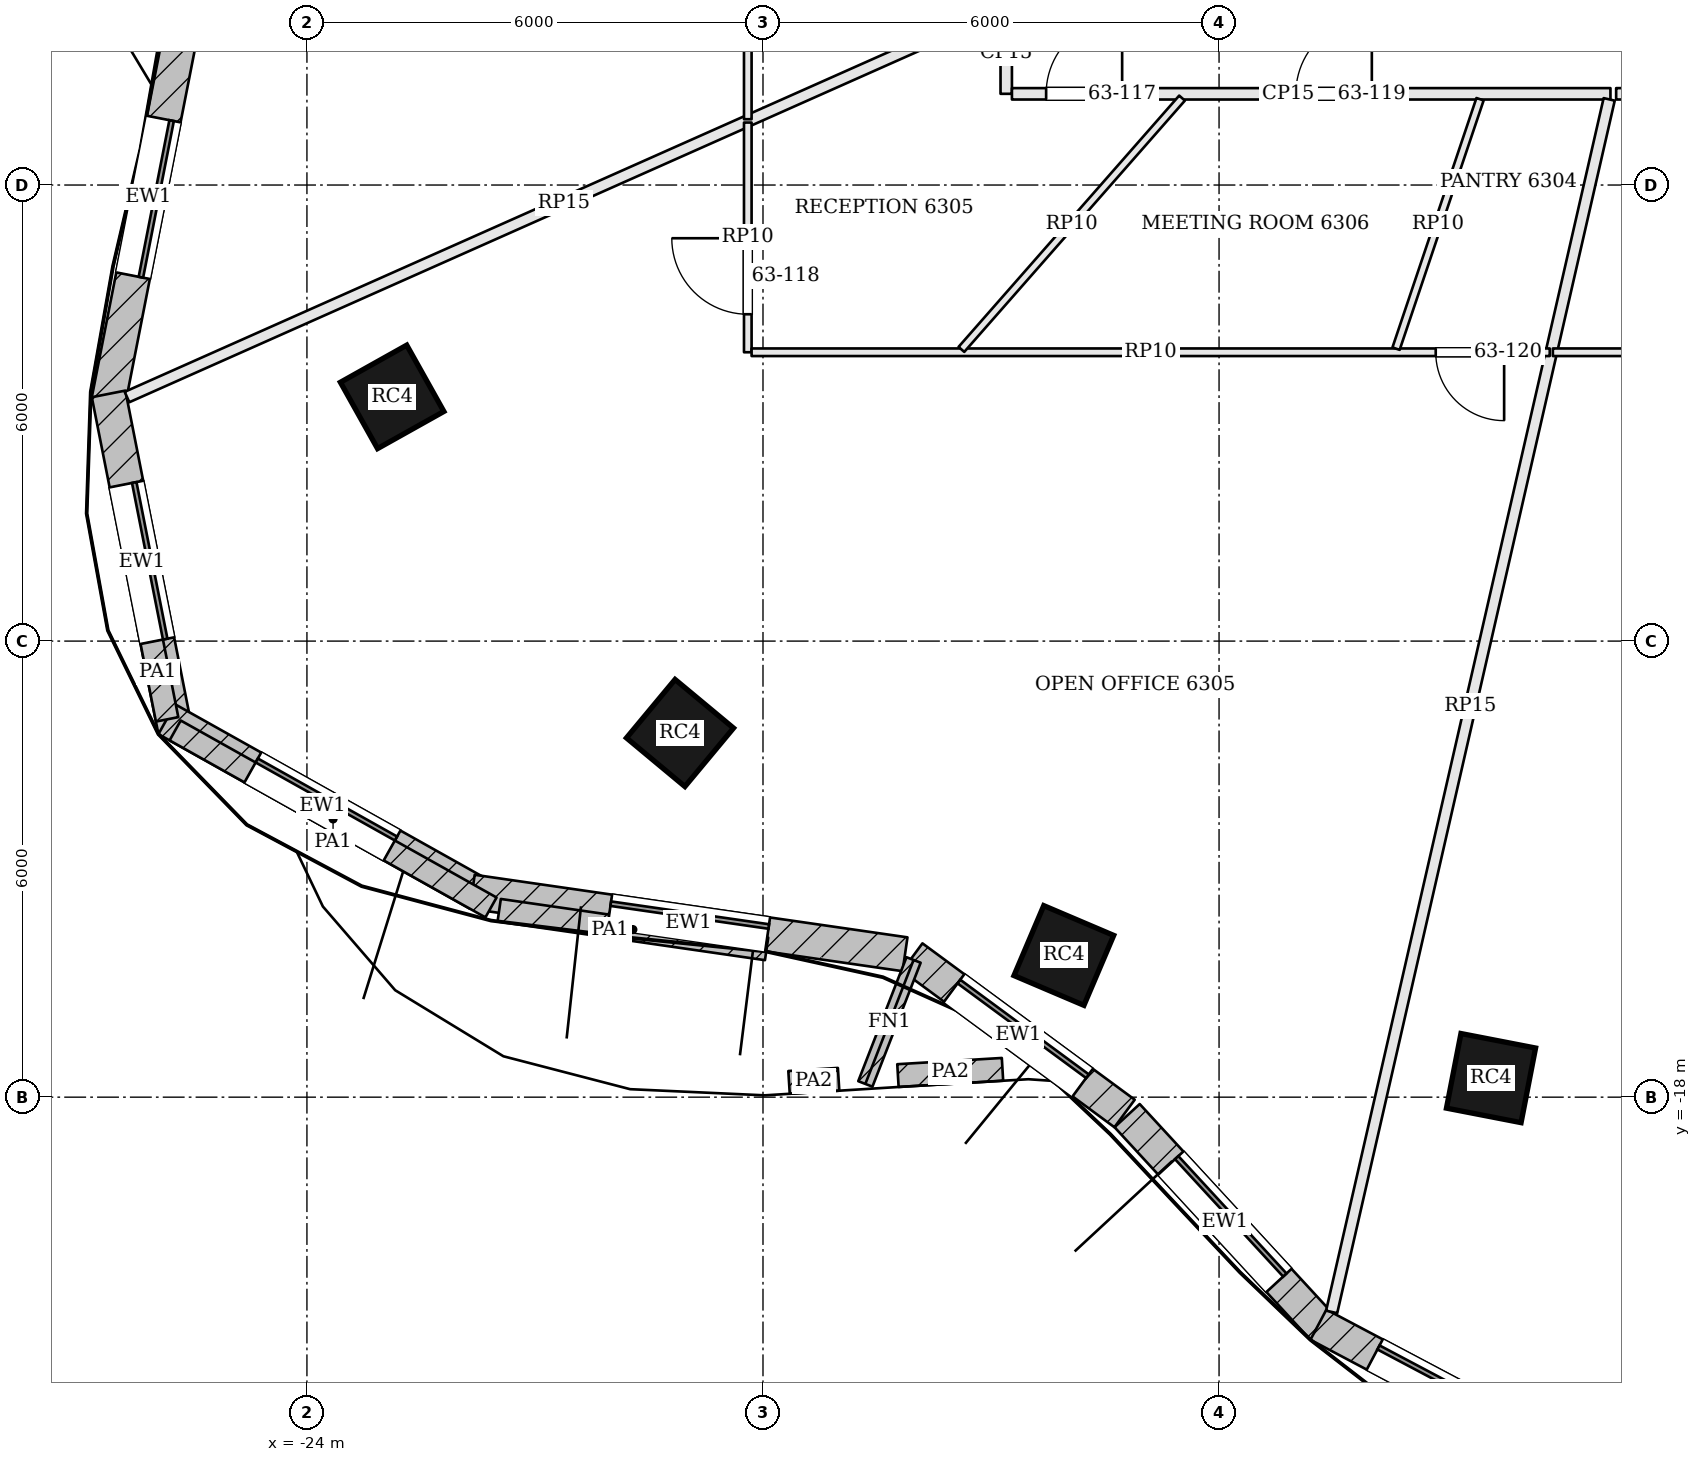
"""IFC4 building model, lengths in metres.
Left out: names, types, materials, properties, quantities, classifications, styles, units other than length and angle.
Written with IfcOpenShell. Run it as: python <this file> out.ifc"""

import sys

from ifc_helpers import new_model, si_unit, direction, frame, frame_2d, origin, origin_2d, place, context, subcontext, project, spatial, rectangle, extrude, element, fill, save


model = new_model("IFC4")
c1 = context("Model", 3, precision=1e-05, world=origin(), true_north=direction((0.0, 1.0)))
c2 = subcontext(c1, "Body", "Model", "MODEL_VIEW")
j1 = project(units=[si_unit("LENGTHUNIT", "METRE"), si_unit("PLANEANGLEUNIT", "RADIAN")], contexts=[c1])
p1 = place(None, origin())
s1 = spatial("IfcSite", under=j1, at=p1, CompositionType="ELEMENT")
p2 = place(p1, origin())
s2 = spatial("IfcBuilding", under=s1, at=p2, CompositionType="ELEMENT")
p3 = place(p2, frame((0.0, 0.0, 256.5)))
s3 = spatial("IfcBuildingStorey", under=s2, at=p3, CompositionType="ELEMENT", Elevation=256.5)
for number, where, z_axis, x_axis in (
    (1, (-22.879, -8.787, 0.0), (0.0, 0.0, 1.0), (0.489, -0.873, 0.0)),
    (2, (-19.092, -13.209, 0.0), (0.0, 0.0, 1.0), (0.769, -0.639, 0.0)),
    (3, (-14.042, -16.136, 0.0), (0.0, 0.0, 1.0), (0.92, -0.392, 0.0)),
    (4, (-8.422, -17.749, 0.0), (0.0, 0.0, 1.0), (0.982, -0.191, 0.0)),
):
    element("IfcColumn", number, at=place(p3, frame(where, z_axis=z_axis, x_axis=x_axis)), inside=s3, PredefinedType="COLUMN", context=c2, shape_type="SweptSolid", body=[
        extrude(rectangle(XDim=1.0, YDim=1.0, at=origin_2d()), origin(), (0.0, 0.0, 1.0), 3.9),
    ])
p4 = place(p3, frame((-25.561, -3.49, 0.0), z_axis=(0.0, 0.0, 1.0), x_axis=(-0.192494026297, -0.981298145234, 0.0)))
e5 = element("IfcWall", 5, at=p4, inside=s3, PredefinedType="SOLIDWALL", context=c2, shape_type="SweptSolid", body=[
    extrude(rectangle(XDim=5.446, YDim=0.45, at=frame_2d((2.723, 0.0))), origin(), (0.0, 0.0, 1.0), 3.7),
])
p5 = place(p4, frame((1.673, 0.0, 0.9)))
e6 = element("IfcOpeningElement", 6, at=p5, cuts=e5, PredefinedType="OPENING", context=c2, shape_type="SweptSolid", body=[
    extrude(rectangle(XDim=2.1, YDim=2.3, at=frame_2d((1.05, 1.15))), frame((0.0, 0.235, 0.0), z_axis=(0.0, -1.0, 0.0), x_axis=(1.0, 0.0, 0.0)), (0.0, 0.0, 1.0), 0.47),
])
p6 = place(p3, frame((-26.61, -8.748, 0.0), z_axis=(0.0, 0.0, 1.0), x_axis=(0.193923166402, -0.981016720312, 0.0)))
e7 = element("IfcWall", 7, at=p6, inside=s3, PredefinedType="SOLIDWALL", context=c2, shape_type="SweptSolid", body=[
    extrude(rectangle(XDim=4.518, YDim=0.45, at=frame_2d((2.259, 0.0))), origin(), (0.0, 0.0, 1.0), 3.7),
])
p7 = place(p6, frame((1.209, 0.0, 0.9)))
e8 = element("IfcOpeningElement", 8, at=p7, cuts=e7, PredefinedType="OPENING", context=c2, shape_type="SweptSolid", body=[
    extrude(rectangle(XDim=2.1, YDim=2.3, at=frame_2d((1.05, 1.15))), frame((0.0, 0.235, 0.0), z_axis=(0.0, -1.0, 0.0), x_axis=(1.0, 0.0, 0.0)), (0.0, 0.0, 1.0), 0.47),
])
p8 = place(p3, frame((-25.844, -13.028, 0.0), z_axis=(0.0, 0.0, 1.0), x_axis=(0.872346398261, -0.488888291373, 0.0)))
e9 = element("IfcWall", 9, at=p8, inside=s3, PredefinedType="SOLIDWALL", context=c2, shape_type="SweptSolid", body=[
    extrude(rectangle(XDim=4.696, YDim=0.45, at=frame_2d((2.348, 0.0))), origin(), (0.0, 0.0, 1.0), 3.7),
])
p9 = place(p8, frame((1.298, 0.0, 0.9)))
e10 = element("IfcOpeningElement", 10, at=p9, cuts=e9, PredefinedType="OPENING", context=c2, shape_type="SweptSolid", body=[
    extrude(rectangle(XDim=2.1, YDim=2.3, at=frame_2d((1.05, 1.15))), frame((0.0, 0.235, 0.0), z_axis=(0.0, -1.0, 0.0), x_axis=(1.0, 0.0, 0.0)), (0.0, 0.0, 1.0), 0.47),
])
p10 = place(p3, frame((-21.825, -15.297, 0.0), z_axis=(0.0, 0.0, 1.0), x_axis=(0.98971474215, -0.143054986527, 0.0)))
e11 = element("IfcWall", 11, at=p10, inside=s3, PredefinedType="SOLIDWALL", context=c2, shape_type="SweptSolid", body=[
    extrude(rectangle(XDim=5.753, YDim=0.45, at=frame_2d((2.876, 0.0))), origin(), (0.0, 0.0, 1.0), 3.7),
])
p11 = place(p10, frame((1.826, 0.0, 0.9)))
e12 = element("IfcOpeningElement", 12, at=p11, cuts=e11, PredefinedType="OPENING", context=c2, shape_type="SweptSolid", body=[
    extrude(rectangle(XDim=2.1, YDim=2.3, at=frame_2d((1.05, 1.15))), frame((0.0, 0.235, 0.0), z_axis=(0.0, -1.0, 0.0), x_axis=(1.0, 0.0, 0.0)), (0.0, 0.0, 1.0), 0.47),
])
p12 = place(p3, frame((-16.036, -16.158, 0.0), z_axis=(0.0, 0.0, 1.0), x_axis=(0.805181432967, -0.593028549064, 0.0)))
e13 = element("IfcWall", 13, at=p12, inside=s3, PredefinedType="SOLIDWALL", context=c2, shape_type="SweptSolid", body=[
    extrude(rectangle(XDim=3.469, YDim=0.45, at=frame_2d((1.734, 0.0))), origin(), (0.0, 0.0, 1.0), 3.7),
])
p13 = place(p12, frame((0.684, 0.0, 0.9)))
e14 = element("IfcOpeningElement", 14, at=p13, cuts=e13, PredefinedType="OPENING", context=c2, shape_type="SweptSolid", body=[
    extrude(rectangle(XDim=2.1, YDim=2.3, at=frame_2d((1.05, 1.15))), frame((0.0, 0.235, 0.0), z_axis=(0.0, -1.0, 0.0), x_axis=(1.0, 0.0, 0.0)), (0.0, 0.0, 1.0), 0.47),
])
p14 = place(p3, frame((-13.209, -18.243, 0.0), z_axis=(0.0, 0.0, 1.0), x_axis=(0.677612152497, -0.735419452278, 0.0)))
e15 = element("IfcWall", 15, at=p14, inside=s3, PredefinedType="SOLIDWALL", context=c2, shape_type="SweptSolid", body=[
    extrude(rectangle(XDim=3.797, YDim=0.45, at=frame_2d((1.898, 0.0))), origin(), (0.0, 0.0, 1.0), 3.7),
])
p15 = place(p14, frame((0.848, 0.0, 0.9)))
e16 = element("IfcOpeningElement", 16, at=p15, cuts=e15, PredefinedType="OPENING", context=c2, shape_type="SweptSolid", body=[
    extrude(rectangle(XDim=2.1, YDim=2.3, at=frame_2d((1.05, 1.15))), frame((0.0, 0.235, 0.0), z_axis=(0.0, -1.0, 0.0), x_axis=(1.0, 0.0, 0.0)), (0.0, 0.0, 1.0), 0.47),
])
p16 = place(p3, frame((-10.693, -20.993, 0.0), z_axis=(0.0, 0.0, 1.0), x_axis=(0.883817790726, -0.46783128668, 0.0)))
e17 = element("IfcWall", 17, at=p16, inside=s3, PredefinedType="SOLIDWALL", context=c2, shape_type="SweptSolid", body=[
    extrude(rectangle(XDim=3.777, YDim=0.45, at=frame_2d((1.888, 0.0))), origin(), (0.0, 0.0, 1.0), 3.7),
])
p17 = place(p16, frame((0.838, 0.0, 0.9)))
e18 = element("IfcOpeningElement", 18, at=p17, cuts=e17, PredefinedType="OPENING", context=c2, shape_type="SweptSolid", body=[
    extrude(rectangle(XDim=2.1, YDim=2.3, at=frame_2d((1.05, 1.15))), frame((0.0, 0.235, 0.0), z_axis=(0.0, -1.0, 0.0), x_axis=(1.0, 0.0, 0.0)), (0.0, 0.0, 1.0), 0.47),
])
p18 = place(p3, frame((-16.019, -16.195, 0.0), z_axis=(0.0, 0.0, 1.0), x_axis=(-0.362641522028, -0.931928713208, 0.0)))
e19 = element("IfcWall", 19, at=p18, inside=s3, PredefinedType="SOLIDWALL", context=c2, shape_type="SweptSolid", body=[
    extrude(rectangle(XDim=1.75, YDim=0.2, at=frame_2d((0.875, 0.0))), origin(), (0.0, 0.0, 1.0), 3.7),
])
p19 = place(p3, frame((-14.849, -17.634, 0.0), z_axis=(0.0, 0.0, 1.0), x_axis=(-0.998215844774, -0.059708686491, 0.0)))
e20 = element("IfcWall", 20, at=p19, inside=s3, PredefinedType="PARAPET", context=c2, shape_type="SweptSolid", body=[
    extrude(rectangle(XDim=1.378, YDim=0.3, at=frame_2d((0.689, 0.0))), origin(), (0.0, 0.0, 1.0), 1.1),
])
p20 = place(p3, frame((-17.005, -17.765, 0.0), z_axis=(0.0, 0.0, 1.0), x_axis=(-0.998026310553, -0.062797161113, 0.0)))
e21 = element("IfcWall", 21, at=p20, inside=s3, PredefinedType="PARAPET", context=c2, shape_type="SweptSolid", body=[
    extrude(rectangle(XDim=0.653, YDim=0.3, at=frame_2d((0.327, 0.0))), origin(), (0.0, 0.0, 1.0), 1.1),
])
p21 = place(p3, frame((-26.084, -11.792, 3.9), z_axis=(0.0, 0.0, 1.0), x_axis=(0.193846183911, -0.981031934742, 0.0)))
e22 = element("IfcWall", 22, at=p21, inside=s3, PredefinedType="PARAPET", context=c2, shape_type="SweptSolid", body=[
    extrude(rectangle(XDim=1.262, YDim=0.3, at=frame_2d((0.631, 0.0))), origin(), (0.0, 0.0, 1.0), 1.1),
])
p22 = place(p3, frame((-25.734, -13.176, 3.9), z_axis=(0.0, 0.0, 1.0), x_axis=(0.872345142407, -0.488890532245, 0.0)))
e23 = element("IfcWall", 23, at=p22, inside=s3, PredefinedType="PARAPET", context=c2, shape_type="SweptSolid", body=[
    extrude(rectangle(XDim=4.763, YDim=0.3, at=frame_2d((2.381, 0.0))), origin(), (0.0, 0.0, 1.0), 1.1),
])
p23 = place(p3, frame((-21.471, -15.541, 3.9), z_axis=(0.0, 0.0, 1.0), x_axis=(0.989713234374, -0.143065417571, 0.0)))
e24 = element("IfcWall", 24, at=p23, inside=s3, PredefinedType="PARAPET", context=c2, shape_type="SweptSolid", body=[
    extrude(rectangle(XDim=3.555, YDim=0.3, at=frame_2d((1.777, 0.0))), origin(), (0.0, 0.0, 1.0), 1.1),
])
p24 = place(p3, frame((-26.367, -8.789, 0.0), z_axis=(0.0, 0.0, 1.0), x_axis=(0.913681107159, 0.40643183244, 0.0)))
e25 = element("IfcWall", 25, at=p24, inside=s3, PredefinedType="PARTITIONING", context=c2, shape_type="SweptSolid", body=[
    extrude(rectangle(XDim=12.585, YDim=0.15, at=frame_2d((6.292, 0.0))), origin(), (0.0, 0.0, 1.0), 3.084),
])
p25 = place(p3, frame((-14.8, -3.719, 0.0), z_axis=(0.0, 0.0, 1.0), x_axis=(0.0, -1.0, 0.0)))
e26 = element("IfcWall", 26, at=p25, inside=s3, PredefinedType="PARTITIONING", context=c2, shape_type="SweptSolid", body=[
    extrude(rectangle(XDim=1.081, YDim=0.15, at=frame_2d((0.541, 0.0))), origin(), (0.0, 0.0, 1.0), 3.084),
])
p26 = place(p3, frame((-14.725, -4.8, 0.0), z_axis=(0.0, 0.0, 1.0), x_axis=(1.0, 0.0, 0.0)))
e27 = element("IfcWall", 27, at=p26, inside=s3, PredefinedType="PARTITIONING", context=c2, shape_type="SweptSolid", body=[
    extrude(rectangle(XDim=7.875, YDim=0.15, at=frame_2d((3.937, 0.0))), origin(), (0.0, 0.0, 1.0), 3.084),
])
p27 = place(p26, frame((0.45, 0.0, 0.0)))
e28 = element("IfcOpeningElement", 28, at=p27, cuts=e27, PredefinedType="OPENING", context=c2, shape_type="SweptSolid", body=[
    extrude(rectangle(XDim=1.0, YDim=2.1, at=frame_2d((0.5, 1.05))), frame((0.0, 0.085, 0.0), z_axis=(0.0, -1.0, 0.0), x_axis=(1.0, 0.0, 0.0)), (0.0, 0.0, 1.0), 0.17),
])
p28 = place(p26, frame((3.735, 0.0, 0.0)))
e29 = element("IfcOpeningElement", 29, at=p28, cuts=e27, PredefinedType="OPENING", context=c2, shape_type="SweptSolid", body=[
    extrude(rectangle(XDim=1.0, YDim=2.4, at=frame_2d((0.5, 1.2))), frame((0.0, 0.085, 0.0), z_axis=(0.0, -1.0, 0.0), x_axis=(1.0, 0.0, 0.0)), (0.0, 0.0, 1.0), 0.17),
])
p29 = place(p3, frame((-10.519, -20.825, 0.0), z_axis=(0.0, 0.0, 1.0), x_axis=(0.223124554472, 0.974789943112, 0.0)))
e30 = element("IfcWall", 30, at=p29, inside=s3, PredefinedType="PARTITIONING", context=c2, shape_type="SweptSolid", body=[
    extrude(rectangle(XDim=16.365, YDim=0.15, at=frame_2d((8.182, 0.0))), origin(), (0.0, 0.0, 1.0), 3.084),
])
p30 = place(p3, frame((-6.776, -4.8, 0.0), z_axis=(0.0, 0.0, 1.0), x_axis=(1.0, 0.0, 0.0)))
e31 = element("IfcWall", 31, at=p30, inside=s3, PredefinedType="PARTITIONING", context=c2, shape_type="SweptSolid", body=[
    extrude(rectangle(XDim=9.114, YDim=0.15, at=frame_2d((4.557, 0.0))), origin(), (0.0, 0.0, 1.0), 3.084),
])
p31 = place(p30, frame((1.49, 0.0, 0.0)))
e32 = element("IfcOpeningElement", 32, at=p31, cuts=e31, PredefinedType="OPENING", context=c2, shape_type="SweptSolid", body=[
    extrude(rectangle(XDim=1.0, YDim=2.1, at=frame_2d((0.5, 1.05))), frame((0.0, 0.085, 0.0), z_axis=(0.0, -1.0, 0.0), x_axis=(1.0, 0.0, 0.0)), (0.0, 0.0, 1.0), 0.17),
])
p32 = place(p30, frame((4.826, 0.0, 0.0)))
e33 = element("IfcOpeningElement", 33, at=p32, cuts=e31, PredefinedType="OPENING", context=c2, shape_type="SweptSolid", body=[
    extrude(rectangle(XDim=1.0, YDim=2.4, at=frame_2d((0.5, 1.2))), frame((0.0, 0.085, 0.0), z_axis=(0.0, -1.0, 0.0), x_axis=(1.0, 0.0, 0.0)), (0.0, 0.0, 1.0), 0.17),
])
p33 = place(p3, frame((-18.2, -5.134, 0.0), z_axis=(0.0, 0.0, 1.0), x_axis=(0.0, 1.0, 0.0)))
e34 = element("IfcWall", 34, at=p33, inside=s3, PredefinedType="PARTITIONING", context=c2, shape_type="SweptSolid", body=[
    extrude(rectangle(XDim=10.122, YDim=0.1, at=frame_2d((5.061, 0.0))), origin(), (0.0, 0.0, 1.0), 3.084),
])
p34 = place(p33, frame((7.217, 0.0, 0.0)))
e35 = element("IfcOpeningElement", 35, at=p34, cuts=e34, PredefinedType="OPENING", context=c2, shape_type="SweptSolid", body=[
    extrude(rectangle(XDim=1.0, YDim=2.1, at=frame_2d((0.5, 1.05))), frame((0.0, 0.06, 0.0), z_axis=(0.0, -1.0, 0.0), x_axis=(1.0, 0.0, 0.0)), (0.0, 0.0, 1.0), 0.12),
])
p35 = place(p3, frame((-18.2, -8.2, 0.0), z_axis=(0.0, 0.0, 1.0), x_axis=(0.0, 1.0, 0.0)))
e36 = element("IfcWall", 36, at=p35, inside=s3, PredefinedType="PARTITIONING", context=c2, shape_type="SweptSolid", body=[
    extrude(rectangle(XDim=3.022, YDim=0.1, at=frame_2d((1.511, 0.0))), origin(), (0.0, 0.0, 1.0), 3.084),
])
p36 = place(p35, frame((0.5, 0.0, 0.0)))
e37 = element("IfcOpeningElement", 37, at=p36, cuts=e36, PredefinedType="OPENING", context=c2, shape_type="SweptSolid", body=[
    extrude(rectangle(XDim=1.0, YDim=2.1, at=frame_2d((0.5, 1.05))), frame((0.0, 0.06, 0.0), z_axis=(0.0, -1.0, 0.0), x_axis=(1.0, 0.0, 0.0)), (0.0, 0.0, 1.0), 0.12),
])
p37 = place(p3, frame((-7.649, -8.2, 0.0), z_axis=(0.0, 0.0, 1.0), x_axis=(-1.0, 0.0, 0.0)))
e38 = element("IfcWall", 38, at=p37, inside=s3, PredefinedType="PARTITIONING", context=c2, shape_type="SweptSolid", body=[
    extrude(rectangle(XDim=10.5, YDim=0.1, at=frame_2d((5.25, 0.0))), origin(), (0.0, 0.0, 1.0), 3.084),
])
p38 = place(p37, frame((0.6, 0.0, 0.0)))
e39 = element("IfcOpeningElement", 39, at=p38, cuts=e38, PredefinedType="OPENING", context=c2, shape_type="SweptSolid", body=[
    extrude(rectangle(XDim=0.9, YDim=2.1, at=frame_2d((0.45, 1.05))), frame((0.0, 0.06, 0.0), z_axis=(0.0, -1.0, 0.0), x_axis=(1.0, 0.0, 0.0)), (0.0, 0.0, 1.0), 0.12),
])
p39 = place(p3, frame((-12.487, -4.856, 0.0), z_axis=(0.0, 0.0, 1.0), x_axis=(-0.659811872842, -0.751430830122, 0.0)))
e40 = element("IfcWall", 40, at=p39, inside=s3, PredefinedType="PARTITIONING", context=c2, shape_type="SweptSolid", body=[
    extrude(rectangle(XDim=4.399, YDim=0.1, at=frame_2d((2.2, 0.0))), origin(), (0.0, 0.0, 1.0), 3.084),
])
p40 = place(p3, frame((-8.567, -4.871, 0.0), z_axis=(0.0, 0.0, 1.0), x_axis=(-0.319060884331, -0.947734220175, 0.0)))
e41 = element("IfcWall", 41, at=p40, inside=s3, PredefinedType="PARTITIONING", context=c2, shape_type="SweptSolid", body=[
    extrude(rectangle(XDim=3.462, YDim=0.1, at=frame_2d((1.731, 0.0))), origin(), (0.0, 0.0, 1.0), 3.084),
])
p41 = place(p3, frame((2.461, -8.2, 0.0), z_axis=(0.0, 0.0, 1.0), x_axis=(-1.0, 0.0, 0.0)))
e42 = element("IfcWall", 42, at=p41, inside=s3, PredefinedType="PARTITIONING", context=c2, shape_type="SweptSolid", body=[
    extrude(rectangle(XDim=10.07, YDim=0.1, at=frame_2d((5.035, 0.0))), origin(), (0.0, 0.0, 1.0), 3.084),
])
p42 = place(p41, frame((7.315, 0.0, 0.0)))
e43 = element("IfcOpeningElement", 43, at=p42, cuts=e42, PredefinedType="OPENING", context=c2, shape_type="SweptSolid", body=[
    extrude(rectangle(XDim=1.0, YDim=2.1, at=frame_2d((0.5, 1.05))), frame((0.0, 0.06, 0.0), z_axis=(0.0, -1.0, 0.0), x_axis=(1.0, 0.0, 0.0)), (0.0, 0.0, 1.0), 0.12),
])
p43 = place(p41, frame((0.912, 0.0, 0.0)))
e44 = element("IfcOpeningElement", 44, at=p43, cuts=e42, PredefinedType="OPENING", context=c2, shape_type="SweptSolid", body=[
    extrude(rectangle(XDim=0.9, YDim=2.1, at=frame_2d((0.45, 1.05))), frame((0.0, 0.06, 0.0), z_axis=(0.0, -1.0, 0.0), x_axis=(1.0, 0.0, 0.0)), (0.0, 0.0, 1.0), 0.12),
])
p44 = place(p5, origin())
e45 = element("IfcWindow", 45, at=p44, inside=s3, PartitioningType="SINGLE_PANEL", PredefinedType="WINDOW", context=c2, shape_type="SweptSolid", body=[
    extrude(rectangle(XDim=2.1, YDim=2.3, at=frame_2d((1.05, 1.15))), frame((0.0, 0.135, 0.0), z_axis=(0.0, -1.0, 0.0), x_axis=(1.0, 0.0, 0.0)), (0.0, 0.0, 1.0), 0.06),
])
fill(e6, e45)
p45 = place(p7, origin())
e46 = element("IfcWindow", 46, at=p45, inside=s3, PartitioningType="SINGLE_PANEL", PredefinedType="WINDOW", context=c2, shape_type="SweptSolid", body=[
    extrude(rectangle(XDim=2.1, YDim=2.3, at=frame_2d((1.05, 1.15))), frame((0.0, 0.135, 0.0), z_axis=(0.0, -1.0, 0.0), x_axis=(1.0, 0.0, 0.0)), (0.0, 0.0, 1.0), 0.06),
])
fill(e8, e46)
p46 = place(p9, origin())
e47 = element("IfcWindow", 47, at=p46, inside=s3, PartitioningType="SINGLE_PANEL", PredefinedType="WINDOW", context=c2, shape_type="SweptSolid", body=[
    extrude(rectangle(XDim=2.1, YDim=2.3, at=frame_2d((1.05, 1.15))), frame((0.0, 0.135, 0.0), z_axis=(0.0, -1.0, 0.0), x_axis=(1.0, 0.0, 0.0)), (0.0, 0.0, 1.0), 0.06),
])
fill(e10, e47)
p47 = place(p11, origin())
e48 = element("IfcWindow", 48, at=p47, inside=s3, PartitioningType="SINGLE_PANEL", PredefinedType="WINDOW", context=c2, shape_type="SweptSolid", body=[
    extrude(rectangle(XDim=2.1, YDim=2.3, at=frame_2d((1.05, 1.15))), frame((0.0, 0.135, 0.0), z_axis=(0.0, -1.0, 0.0), x_axis=(1.0, 0.0, 0.0)), (0.0, 0.0, 1.0), 0.06),
])
fill(e12, e48)
p48 = place(p13, origin())
e49 = element("IfcWindow", 49, at=p48, inside=s3, PartitioningType="SINGLE_PANEL", PredefinedType="WINDOW", context=c2, shape_type="SweptSolid", body=[
    extrude(rectangle(XDim=2.1, YDim=2.3, at=frame_2d((1.05, 1.15))), frame((0.0, 0.135, 0.0), z_axis=(0.0, -1.0, 0.0), x_axis=(1.0, 0.0, 0.0)), (0.0, 0.0, 1.0), 0.06),
])
fill(e14, e49)
p49 = place(p15, origin())
e50 = element("IfcWindow", 50, at=p49, inside=s3, PartitioningType="SINGLE_PANEL", PredefinedType="WINDOW", context=c2, shape_type="SweptSolid", body=[
    extrude(rectangle(XDim=2.1, YDim=2.3, at=frame_2d((1.05, 1.15))), frame((0.0, 0.135, 0.0), z_axis=(0.0, -1.0, 0.0), x_axis=(1.0, 0.0, 0.0)), (0.0, 0.0, 1.0), 0.06),
])
fill(e16, e50)
p50 = place(p17, origin())
e51 = element("IfcWindow", 51, at=p50, inside=s3, PartitioningType="SINGLE_PANEL", PredefinedType="WINDOW", context=c2, shape_type="SweptSolid", body=[
    extrude(rectangle(XDim=2.1, YDim=2.3, at=frame_2d((1.05, 1.15))), frame((0.0, 0.135, 0.0), z_axis=(0.0, -1.0, 0.0), x_axis=(1.0, 0.0, 0.0)), (0.0, 0.0, 1.0), 0.06),
])
fill(e18, e51)
p51 = place(p27, origin())
e52 = element("IfcDoor", 52, at=p51, inside=s3, OperationType="SINGLE_SWING_RIGHT", PredefinedType="DOOR", context=c2, shape_type="SweptSolid", body=[
    extrude(rectangle(XDim=1.0, YDim=2.1, at=frame_2d((0.5, 1.05))), frame((0.0, 0.025, 0.0), z_axis=(0.0, -1.0, 0.0), x_axis=(1.0, 0.0, 0.0)), (0.0, 0.0, 1.0), 0.05),
])
fill(e28, e52)
p52 = place(p36, origin())
e53 = element("IfcDoor", 53, at=p52, inside=s3, OperationType="SINGLE_SWING_RIGHT", PredefinedType="DOOR", context=c2, shape_type="SweptSolid", body=[
    extrude(rectangle(XDim=1.0, YDim=2.1, at=frame_2d((0.5, 1.05))), frame((0.0, 0.025, 0.0), z_axis=(0.0, -1.0, 0.0), x_axis=(1.0, 0.0, 0.0)), (0.0, 0.0, 1.0), 0.05),
])
fill(e37, e53)
p53 = place(p28, origin())
e54 = element("IfcDoor", 54, at=p53, inside=s3, OperationType="SINGLE_SWING_RIGHT", PredefinedType="DOOR", context=c2, shape_type="SweptSolid", body=[
    extrude(rectangle(XDim=1.0, YDim=2.4, at=frame_2d((0.5, 1.2))), frame((0.0, 0.025, 0.0), z_axis=(0.0, -1.0, 0.0), x_axis=(1.0, 0.0, 0.0)), (0.0, 0.0, 1.0), 0.05),
])
fill(e29, e54)
p54 = place(p38, origin())
e55 = element("IfcDoor", 55, at=p54, inside=s3, OperationType="SINGLE_SWING_LEFT", PredefinedType="DOOR", context=c2, shape_type="SweptSolid", body=[
    extrude(rectangle(XDim=0.9, YDim=2.1, at=frame_2d((0.45, 1.05))), frame((0.0, 0.025, 0.0), z_axis=(0.0, -1.0, 0.0), x_axis=(1.0, 0.0, 0.0)), (0.0, 0.0, 1.0), 0.05),
])
fill(e39, e55)
save(model, sys.argv[1])
